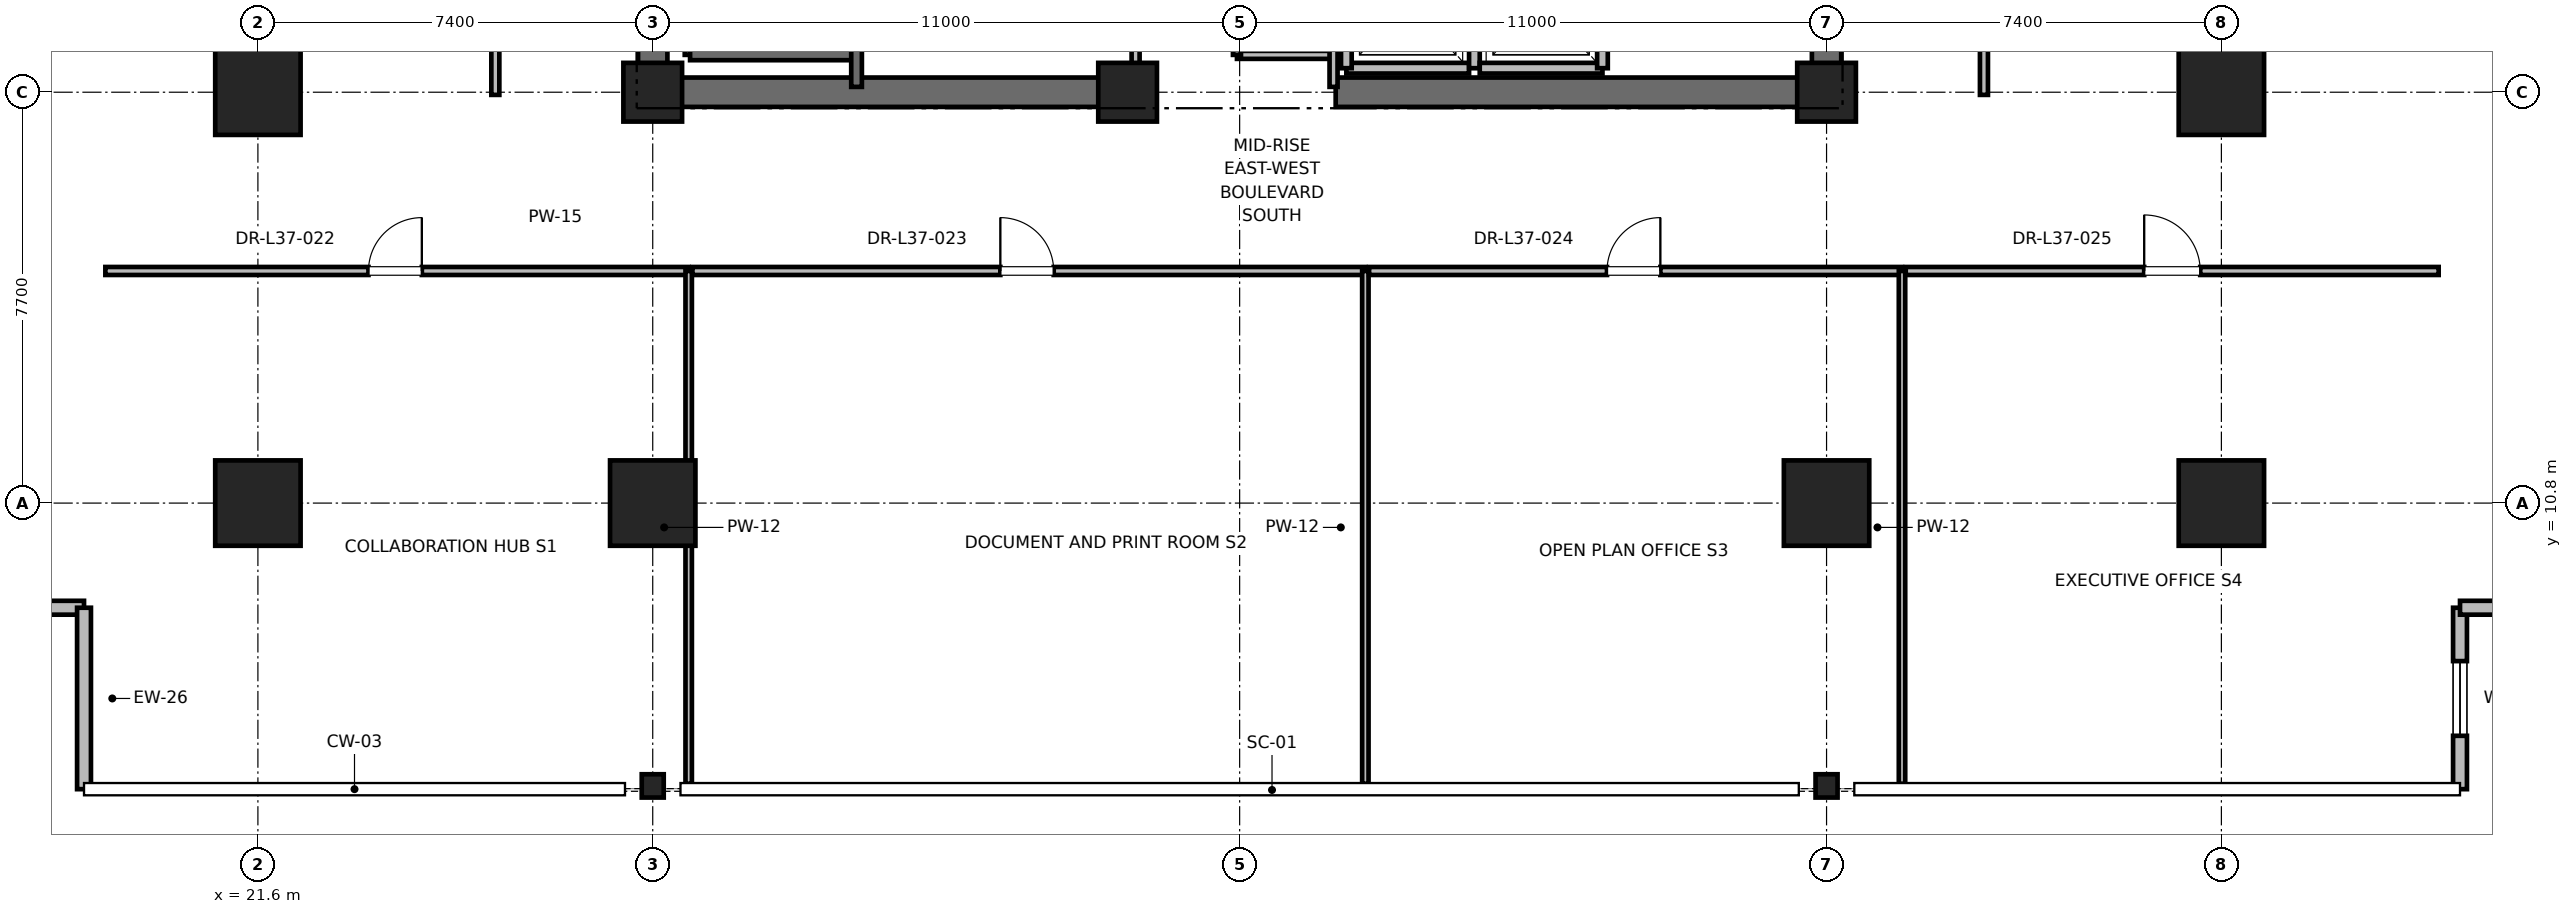
"""IFC4 building model, lengths in metres.
Left out: names, types, materials, properties, quantities, classifications, styles, units other than length and angle.
Written with IfcOpenShell. Run it as: python <this file> out.ifc"""

import sys

from ifc_helpers import new_model, si_unit, direction, frame, frame_2d, origin, origin_2d, place, context, subcontext, project, spatial, rectangle, i_section, extrude, element, fill, save


model = new_model("IFC4")
c1 = context("Model", 3, precision=1e-05, world=origin(), true_north=direction((0.0, 1.0)))
c2 = subcontext(c1, "Body", "Model", "MODEL_VIEW")
j1 = project(units=[si_unit("LENGTHUNIT", "METRE"), si_unit("PLANEANGLEUNIT", "RADIAN")], contexts=[c1])
p1 = place(None, origin())
s1 = spatial("IfcSite", under=j1, at=p1, CompositionType="ELEMENT")
p2 = place(p1, origin())
s2 = spatial("IfcBuilding", under=s1, at=p2, CompositionType="ELEMENT")
p3 = place(p2, frame((0.0, 0.0, 160.4)))
s3 = spatial("IfcBuildingStorey", under=s2, at=p3, CompositionType="ELEMENT", Elevation=160.4)
for number, where, z_axis, x_axis in (
    (1, (29.0, 10.8, 0.0), (0.0, 0.0, 1.0), (1.0, 0.0, 0.0)),
    (2, (51.0, 10.8, 0.0), (0.0, 0.0, 1.0), (1.0, 0.0, 0.0)),
    (3, (21.6, 18.5, 0.0), (0.0, 0.0, 1.0), (1.0, 0.0, 0.0)),
    (4, (58.4, 18.5, 0.0), (0.0, 0.0, 1.0), (1.0, 0.0, 0.0)),
    (5, (21.6, 10.8, 0.0), (0.0, 0.0, 1.0), (1.0, 0.0, 0.0)),
    (6, (58.4, 10.8, 0.0), (0.0, 0.0, 1.0), (1.0, 0.0, 0.0)),
):
    element("IfcColumn", number, at=place(p3, frame(where, z_axis=z_axis, x_axis=x_axis)), inside=s3, PredefinedType="COLUMN", context=c2, shape_type="SweptSolid", body=[
        extrude(rectangle(XDim=1.6, YDim=1.6, at=origin_2d()), origin(), (0.0, 0.0, 1.0), 4.0),
    ])
for number, where, z_axis, x_axis in (
    (7, (29.0, 5.5, 0.0), (0.0, 0.0, 1.0), (1.0, 0.0, 0.0)),
    (8, (51.0, 5.5, 0.0), (0.0, 0.0, 1.0), (1.0, 0.0, 0.0)),
):
    element("IfcColumn", number, at=place(p3, frame(where, z_axis=z_axis, x_axis=x_axis)), inside=s3, PredefinedType="COLUMN", context=c2, shape_type="SweptSolid", body=[
        extrude(i_section(OverallWidth=0.412, OverallDepth=0.437, WebThickness=0.036, FlangeThickness=0.058, FilletRadius=0.015, at=origin_2d()), origin(), (0.0, 0.0, 1.0), 4.0),
    ])
for number, where, z_axis, x_axis in (
    (9, (29.0, 18.5, 0.0), (0.0, 0.0, 1.0), (1.0, 0.0, 0.0)),
    (10, (51.0, 18.5, 0.0), (0.0, 0.0, 1.0), (1.0, 0.0, 0.0)),
    (11, (37.9, 18.5, 0.0), (0.0, 0.0, 1.0), (1.0, 0.0, 0.0)),
):
    element("IfcColumn", number, at=place(p3, frame(where, z_axis=z_axis, x_axis=x_axis)), inside=s3, PredefinedType="PILASTER", context=c2, shape_type="SweptSolid", body=[
        extrude(rectangle(XDim=1.1, YDim=1.1, at=origin_2d()), origin(), (0.0, 0.0, 1.0), 4.0),
    ])
for number, where, z_axis, x_axis in (
    (12, (29.0, 18.5, 0.0), (0.0, 0.0, 1.0), (1.0, 0.0, 0.0)),
    (13, (41.8, 18.5, 0.0), (0.0, 0.0, 1.0), (1.0, 0.0, 0.0)),
):
    element("IfcWall", number, at=place(p3, frame(where, z_axis=z_axis, x_axis=x_axis)), inside=s3, PredefinedType="SHEAR", context=c2, shape_type="SweptSolid", body=[
        extrude(rectangle(XDim=9.2, YDim=0.55, at=frame_2d((4.6, 0.0))), origin(), (0.0, 0.0, 1.0), 3.775),
    ])
p4 = place(p3, frame((29.0, 18.5, 0.0), z_axis=(0.0, 0.0, 1.0), x_axis=(0.0, 1.0, 0.0)))
e14 = element("IfcWall", 14, at=p4, inside=s3, PredefinedType="SHEAR", context=c2, shape_type="SweptSolid", body=[
    extrude(rectangle(XDim=8.8, YDim=0.55, at=frame_2d((4.4, 0.0))), origin(), (0.0, 0.0, 1.0), 3.775),
])
p5 = place(p3, frame((51.0, 18.5, 0.0), z_axis=(0.0, 0.0, 1.0), x_axis=(0.0, 1.0, 0.0)))
e15 = element("IfcWall", 15, at=p5, inside=s3, PredefinedType="SHEAR", context=c2, shape_type="SweptSolid", body=[
    extrude(rectangle(XDim=5.8, YDim=0.55, at=frame_2d((2.9, 0.0))), origin(), (0.0, 0.0, 1.0), 3.775),
])
p6 = place(p3, frame((14.541, 8.839, 0.0), z_axis=(0.0, 0.0, 1.0), x_axis=(1.0, 0.0, 0.0)))
e16 = element("IfcWall", 16, at=p6, inside=s3, PredefinedType="PARAPET", context=c2, shape_type="SweptSolid", body=[
    extrude(rectangle(XDim=3.8, YDim=0.26, at=frame_2d((1.9, 0.0))), origin(), (0.0, 0.0, 1.0), 3.775),
])
p7 = place(p6, frame((1.2, 0.0, 0.85)))
e17 = element("IfcOpeningElement", 17, at=p7, cuts=e16, PredefinedType="OPENING", context=c2, shape_type="SweptSolid", body=[
    extrude(rectangle(XDim=1.4, YDim=2.0, at=frame_2d((0.7, 1.0))), frame((0.0, 0.13, 0.0), z_axis=(0.0, -1.0, 0.0), x_axis=(1.0, 0.0, 0.0)), (0.0, 0.0, 1.0), 0.26),
])
p8 = place(p3, frame((18.341, 8.839, 0.0), z_axis=(0.0, 0.0, 1.0), x_axis=(0.0, -1.0, 0.0)))
e18 = element("IfcWall", 18, at=p8, inside=s3, PredefinedType="PARAPET", context=c2, shape_type="SweptSolid", body=[
    extrude(rectangle(XDim=3.4, YDim=0.26, at=frame_2d((1.7, 0.0))), origin(), (0.0, 0.0, 1.0), 3.775),
])
p9 = place(p3, frame((62.872, 5.439, 0.0), z_axis=(0.0, 0.0, 1.0), x_axis=(0.0, 1.0, 0.0)))
e19 = element("IfcWall", 19, at=p9, inside=s3, PredefinedType="PARAPET", context=c2, shape_type="SweptSolid", body=[
    extrude(rectangle(XDim=3.4, YDim=0.26, at=frame_2d((1.7, 0.0))), origin(), (0.0, 0.0, 1.0), 3.775),
])
p10 = place(p9, frame((1.0, 0.0, 0.85)))
e20 = element("IfcOpeningElement", 20, at=p10, cuts=e19, PredefinedType="OPENING", context=c2, shape_type="SweptSolid", body=[
    extrude(rectangle(XDim=1.4, YDim=2.0, at=frame_2d((0.7, 1.0))), frame((0.0, 0.13, 0.0), z_axis=(0.0, -1.0, 0.0), x_axis=(1.0, 0.0, 0.0)), (0.0, 0.0, 1.0), 0.26),
])
p11 = place(p3, frame((62.872, 8.839, 0.0), z_axis=(0.0, 0.0, 1.0), x_axis=(1.0, 0.0, 0.0)))
e21 = element("IfcWall", 21, at=p11, inside=s3, PredefinedType="PARAPET", context=c2, shape_type="SweptSolid", body=[
    extrude(rectangle(XDim=3.8, YDim=0.26, at=frame_2d((1.9, 0.0))), origin(), (0.0, 0.0, 1.0), 3.775),
])
p12 = place(p3, frame((29.7, 19.2, 0.0), z_axis=(0.0, 0.0, 1.0), x_axis=(0.0, 1.0, 0.0)))
e22 = element("IfcWall", 22, at=p12, inside=s3, PredefinedType="SOLIDWALL", context=c2, shape_type="SweptSolid", body=[
    extrude(rectangle(XDim=8.15, YDim=0.2, at=frame_2d((4.075, 0.0))), origin(), (0.0, 0.0, 1.0), 3.775),
])
p13 = place(p3, frame((29.7, 19.2, 0.0), z_axis=(0.0, 0.0, 1.0), x_axis=(1.0, 0.0, 0.0)))
e23 = element("IfcWall", 23, at=p13, inside=s3, PredefinedType="SOLIDWALL", context=c2, shape_type="SweptSolid", body=[
    extrude(rectangle(XDim=3.12, YDim=0.2, at=frame_2d((1.56, 0.0))), origin(), (0.0, 0.0, 1.0), 3.775),
])
p14 = place(p3, frame((32.82, 18.6, 0.0), z_axis=(0.0, 0.0, 1.0), x_axis=(0.0, 1.0, 0.0)))
e24 = element("IfcWall", 24, at=p14, inside=s3, PredefinedType="SOLIDWALL", context=c2, shape_type="SweptSolid", body=[
    extrude(rectangle(XDim=8.78, YDim=0.2, at=frame_2d((4.39, 0.0))), origin(), (0.0, 0.0, 1.0), 3.775),
])
p15 = place(p3, frame((42.0, 18.95, 0.0), z_axis=(0.0, 0.0, 1.0), x_axis=(1.0, 0.0, 0.0)))
e25 = element("IfcWall", 25, at=p15, inside=s3, PredefinedType="SOLIDWALL", context=c2, shape_type="SweptSolid", body=[
    extrude(rectangle(XDim=2.3, YDim=0.2, at=frame_2d((1.15, 0.0))), origin(), (0.0, 0.0, 1.0), 2.755),
])
p16 = place(p3, frame((42.0, 21.55, 0.0), z_axis=(0.0, 0.0, 1.0), x_axis=(0.0, -1.0, 0.0)))
e26 = element("IfcWall", 26, at=p16, inside=s3, PredefinedType="SOLIDWALL", context=c2, shape_type="SweptSolid", body=[
    extrude(rectangle(XDim=2.6, YDim=0.2, at=frame_2d((1.3, 0.0))), origin(), (0.0, 0.0, 1.0), 2.755),
])
p17 = place(p3, frame((44.4, 18.95, 0.0), z_axis=(0.0, 0.0, 1.0), x_axis=(0.0, 1.0, 0.0)))
e27 = element("IfcWall", 27, at=p17, inside=s3, PredefinedType="SOLIDWALL", context=c2, shape_type="SweptSolid", body=[
    extrude(rectangle(XDim=2.6, YDim=0.2, at=frame_2d((1.3, 0.0))), origin(), (0.0, 0.0, 1.0), 3.775),
])
p18 = place(p3, frame((44.5, 18.95, 0.0), z_axis=(0.0, 0.0, 1.0), x_axis=(1.0, 0.0, 0.0)))
e28 = element("IfcWall", 28, at=p18, inside=s3, PredefinedType="SOLIDWALL", context=c2, shape_type="SweptSolid", body=[
    extrude(rectangle(XDim=2.3, YDim=0.2, at=frame_2d((1.15, 0.0))), origin(), (0.0, 0.0, 1.0), 3.775),
])
p19 = place(p3, frame((46.8, 18.95, 0.0), z_axis=(0.0, 0.0, 1.0), x_axis=(0.0, 1.0, 0.0)))
e29 = element("IfcWall", 29, at=p19, inside=s3, PredefinedType="SOLIDWALL", context=c2, shape_type="SweptSolid", body=[
    extrude(rectangle(XDim=2.6, YDim=0.2, at=frame_2d((1.3, 0.0))), origin(), (0.0, 0.0, 1.0), 3.775),
])
p20 = place(p3, frame((39.95, 19.2, 0.0), z_axis=(0.0, 0.0, 1.0), x_axis=(1.0, 0.0, 0.0)))
e30 = element("IfcWall", 30, at=p20, inside=s3, PredefinedType="PARTITIONING", context=c2, shape_type="SweptSolid", body=[
    extrude(rectangle(XDim=1.81, YDim=0.15, at=frame_2d((0.905, 0.0))), origin(), (0.0, 0.0, 1.0), 2.85),
])
p21 = place(p3, frame((41.76, 18.6, 0.0), z_axis=(0.0, 0.0, 1.0), x_axis=(0.0, 1.0, 0.0)))
e31 = element("IfcWall", 31, at=p21, inside=s3, PredefinedType="PARTITIONING", context=c2, shape_type="SweptSolid", body=[
    extrude(rectangle(XDim=3.6, YDim=0.15, at=frame_2d((1.8, 0.0))), origin(), (0.0, 0.0, 1.0), 2.755),
])
p22 = place(p3, frame((39.95, 19.2, 0.0), z_axis=(0.0, 0.0, 1.0), x_axis=(0.0, 1.0, 0.0)))
e32 = element("IfcWall", 32, at=p22, inside=s3, PredefinedType="PARTITIONING", context=c2, shape_type="SweptSolid", body=[
    extrude(rectangle(XDim=3.0, YDim=0.15, at=frame_2d((1.5, 0.0))), origin(), (0.0, 0.0, 1.0), 2.85),
])
p23 = place(p22, frame((1.05, 0.0, 0.0)))
e33 = element("IfcOpeningElement", 33, at=p23, cuts=e32, PredefinedType="OPENING", context=c2, shape_type="SweptSolid", body=[
    extrude(rectangle(XDim=0.9, YDim=2.1, at=frame_2d((0.45, 1.05))), frame((0.0, 0.075, 0.0), z_axis=(0.0, -1.0, 0.0), x_axis=(1.0, 0.0, 0.0)), (0.0, 0.0, 1.0), 0.15),
])
p24 = place(p3, frame((38.05, 18.6, 0.0), z_axis=(0.0, 0.0, 1.0), x_axis=(0.0, 1.0, 0.0)))
e34 = element("IfcWall", 34, at=p24, inside=s3, PredefinedType="PARTITIONING", context=c2, shape_type="SweptSolid", body=[
    extrude(rectangle(XDim=3.06, YDim=0.15, at=frame_2d((1.53, 0.0))), origin(), (0.0, 0.0, 1.0), 2.755),
])
p25 = place(p24, frame((1.03, 0.0, 0.0)))
e35 = element("IfcOpeningElement", 35, at=p25, cuts=e34, PredefinedType="OPENING", context=c2, shape_type="SweptSolid", body=[
    extrude(rectangle(XDim=1.0, YDim=2.15, at=frame_2d((0.5, 1.075))), frame((0.0, 0.075, 0.0), z_axis=(0.0, -1.0, 0.0), x_axis=(1.0, 0.0, 0.0)), (0.0, 0.0, 1.0), 0.15),
])
p26 = place(p3, frame((18.741, 15.15, 0.0), z_axis=(0.0, 0.0, 1.0), x_axis=(1.0, 0.0, 0.0)))
e36 = element("IfcWall", 36, at=p26, inside=s3, PredefinedType="PARTITIONING", context=c2, shape_type="SweptSolid", body=[
    extrude(rectangle(XDim=10.933, YDim=0.15, at=frame_2d((5.466, 0.0))), origin(), (0.0, 0.0, 1.0), 2.85),
])
p27 = place(p26, frame((4.931, 0.0, 0.0)))
e37 = element("IfcOpeningElement", 37, at=p27, cuts=e36, PredefinedType="OPENING", context=c2, shape_type="SweptSolid", body=[
    extrude(rectangle(XDim=1.0, YDim=2.15, at=frame_2d((0.5, 1.075))), frame((0.0, 0.075, 0.0), z_axis=(0.0, -1.0, 0.0), x_axis=(1.0, 0.0, 0.0)), (0.0, 0.0, 1.0), 0.15),
])
p28 = place(p3, frame((29.674, 5.539, 0.0), z_axis=(0.0, 0.0, 1.0), x_axis=(0.0, 1.0, 0.0)))
e38 = element("IfcWall", 38, at=p28, inside=s3, PredefinedType="PARTITIONING", context=c2, shape_type="SweptSolid", body=[
    extrude(rectangle(XDim=9.611, YDim=0.12, at=frame_2d((4.806, 0.0))), origin(), (0.0, 0.0, 1.0), 2.405),
])
p29 = place(p3, frame((29.744, 15.15, 0.0), z_axis=(0.0, 0.0, 1.0), x_axis=(1.0, 0.0, 0.0)))
e39 = element("IfcWall", 39, at=p29, inside=s3, PredefinedType="PARTITIONING", context=c2, shape_type="SweptSolid", body=[
    extrude(rectangle(XDim=12.612, YDim=0.15, at=frame_2d((6.306, 0.0))), origin(), (0.0, 0.0, 1.0), 2.85),
])
p30 = place(p29, frame((5.771, 0.0, 0.0)))
e40 = element("IfcOpeningElement", 40, at=p30, cuts=e39, PredefinedType="OPENING", context=c2, shape_type="SweptSolid", body=[
    extrude(rectangle(XDim=1.0, YDim=2.15, at=frame_2d((0.5, 1.075))), frame((0.0, 0.075, 0.0), z_axis=(0.0, -1.0, 0.0), x_axis=(1.0, 0.0, 0.0)), (0.0, 0.0, 1.0), 0.15),
])
p31 = place(p3, frame((42.356, 5.539, 0.0), z_axis=(0.0, 0.0, 1.0), x_axis=(0.0, 1.0, 0.0)))
e41 = element("IfcWall", 41, at=p31, inside=s3, PredefinedType="PARTITIONING", context=c2, shape_type="SweptSolid", body=[
    extrude(rectangle(XDim=9.611, YDim=0.12, at=frame_2d((4.806, 0.0))), origin(), (0.0, 0.0, 1.0), 2.405),
])
p32 = place(p3, frame((42.426, 15.15, 0.0), z_axis=(0.0, 0.0, 1.0), x_axis=(1.0, 0.0, 0.0)))
e42 = element("IfcWall", 42, at=p32, inside=s3, PredefinedType="PARTITIONING", context=c2, shape_type="SweptSolid", body=[
    extrude(rectangle(XDim=9.988, YDim=0.15, at=frame_2d((4.994, 0.0))), origin(), (0.0, 0.0, 1.0), 2.85),
])
p33 = place(p32, frame((4.459, 0.0, 0.0)))
e43 = element("IfcOpeningElement", 43, at=p33, cuts=e42, PredefinedType="OPENING", context=c2, shape_type="SweptSolid", body=[
    extrude(rectangle(XDim=1.0, YDim=2.15, at=frame_2d((0.5, 1.075))), frame((0.0, 0.075, 0.0), z_axis=(0.0, -1.0, 0.0), x_axis=(1.0, 0.0, 0.0)), (0.0, 0.0, 1.0), 0.15),
])
p34 = place(p3, frame((52.414, 5.539, 0.0), z_axis=(0.0, 0.0, 1.0), x_axis=(0.0, 1.0, 0.0)))
e44 = element("IfcWall", 44, at=p34, inside=s3, PredefinedType="PARTITIONING", context=c2, shape_type="SweptSolid", body=[
    extrude(rectangle(XDim=9.611, YDim=0.12, at=frame_2d((4.806, 0.0))), origin(), (0.0, 0.0, 1.0), 2.85),
])
p35 = place(p3, frame((52.484, 15.15, 0.0), z_axis=(0.0, 0.0, 1.0), x_axis=(1.0, 0.0, 0.0)))
e45 = element("IfcWall", 45, at=p35, inside=s3, PredefinedType="PARTITIONING", context=c2, shape_type="SweptSolid", body=[
    extrude(rectangle(XDim=9.988, YDim=0.15, at=frame_2d((4.994, 0.0))), origin(), (0.0, 0.0, 1.0), 2.85),
])
p36 = place(p35, frame((4.469, 0.0, 0.0)))
e46 = element("IfcOpeningElement", 46, at=p36, cuts=e45, PredefinedType="OPENING", context=c2, shape_type="SweptSolid", body=[
    extrude(rectangle(XDim=1.05, YDim=2.2, at=frame_2d((0.525, 1.1))), frame((0.0, 0.075, 0.0), z_axis=(0.0, -1.0, 0.0), x_axis=(1.0, 0.0, 0.0)), (0.0, 0.0, 1.0), 0.15),
])
p37 = place(p3, frame((26.05, 18.45, 0.0), z_axis=(0.0, 0.0, 1.0), x_axis=(0.0, 1.0, 0.0)))
e47 = element("IfcWall", 47, at=p37, inside=s3, PredefinedType="PARTITIONING", context=c2, shape_type="SweptSolid", body=[
    extrude(rectangle(XDim=6.335, YDim=0.15, at=frame_2d((3.167, 0.0))), origin(), (0.0, 0.0, 1.0), 2.85),
])
p38 = place(p37, frame((2.458, 0.0, 0.0)))
e48 = element("IfcOpeningElement", 48, at=p38, cuts=e47, PredefinedType="OPENING", context=c2, shape_type="SweptSolid", body=[
    extrude(rectangle(XDim=1.5, YDim=2.25, at=frame_2d((0.75, 1.125))), frame((0.0, 0.075, 0.0), z_axis=(0.0, -1.0, 0.0), x_axis=(1.0, 0.0, 0.0)), (0.0, 0.0, 1.0), 0.15),
])
p39 = place(p3, frame((53.95, 18.45, 0.0), z_axis=(0.0, 0.0, 1.0), x_axis=(0.0, 1.0, 0.0)))
e49 = element("IfcWall", 49, at=p39, inside=s3, PredefinedType="PARTITIONING", context=c2, shape_type="SweptSolid", body=[
    extrude(rectangle(XDim=7.602, YDim=0.15, at=frame_2d((3.801, 0.0))), origin(), (0.0, 0.0, 1.0), 2.85),
])
p40 = place(p39, frame((3.341, 0.0, 0.0)))
e50 = element("IfcOpeningElement", 50, at=p40, cuts=e49, PredefinedType="OPENING", context=c2, shape_type="SweptSolid", body=[
    extrude(rectangle(XDim=1.0, YDim=2.15, at=frame_2d((0.5, 1.075))), frame((0.0, 0.075, 0.0), z_axis=(0.0, -1.0, 0.0), x_axis=(1.0, 0.0, 0.0)), (0.0, 0.0, 1.0), 0.15),
])
p41 = place(p10, origin())
e51 = element("IfcWindow", 51, at=p41, inside=s3, PartitioningType="SINGLE_PANEL", PredefinedType="WINDOW", context=c2, shape_type="SweptSolid", body=[
    extrude(rectangle(XDim=1.4, YDim=2.0, at=frame_2d((0.7, 1.0))), frame((0.0, 0.03, 0.0), z_axis=(0.0, -1.0, 0.0), x_axis=(1.0, 0.0, 0.0)), (0.0, 0.0, 1.0), 0.06),
])
fill(e20, e51)
p42 = place(p27, origin())
e52 = element("IfcDoor", 52, at=p42, inside=s3, OperationType="SINGLE_SWING_RIGHT", PredefinedType="DOOR", context=c2, shape_type="SweptSolid", body=[
    extrude(rectangle(XDim=1.0, YDim=2.15, at=frame_2d((0.5, 1.075))), frame((0.0, 0.025, 0.0), z_axis=(0.0, -1.0, 0.0), x_axis=(1.0, 0.0, 0.0)), (0.0, 0.0, 1.0), 0.05),
])
fill(e37, e52)
p43 = place(p30, origin())
e53 = element("IfcDoor", 53, at=p43, inside=s3, OperationType="SINGLE_SWING_LEFT", PredefinedType="DOOR", context=c2, shape_type="SweptSolid", body=[
    extrude(rectangle(XDim=1.0, YDim=2.15, at=frame_2d((0.5, 1.075))), frame((0.0, 0.025, 0.0), z_axis=(0.0, -1.0, 0.0), x_axis=(1.0, 0.0, 0.0)), (0.0, 0.0, 1.0), 0.05),
])
fill(e40, e53)
p44 = place(p33, origin())
e54 = element("IfcDoor", 54, at=p44, inside=s3, OperationType="SINGLE_SWING_RIGHT", PredefinedType="DOOR", context=c2, shape_type="SweptSolid", body=[
    extrude(rectangle(XDim=1.0, YDim=2.15, at=frame_2d((0.5, 1.075))), frame((0.0, 0.025, 0.0), z_axis=(0.0, -1.0, 0.0), x_axis=(1.0, 0.0, 0.0)), (0.0, 0.0, 1.0), 0.05),
])
fill(e43, e54)
p45 = place(p36, origin())
e55 = element("IfcDoor", 55, at=p45, inside=s3, OperationType="SINGLE_SWING_LEFT", PredefinedType="DOOR", context=c2, shape_type="SweptSolid", body=[
    extrude(rectangle(XDim=1.05, YDim=2.2, at=frame_2d((0.525, 1.1))), frame((0.0, 0.025, 0.0), z_axis=(0.0, -1.0, 0.0), x_axis=(1.0, 0.0, 0.0)), (0.0, 0.0, 1.0), 0.05),
])
fill(e46, e55)
save(model, sys.argv[1])
